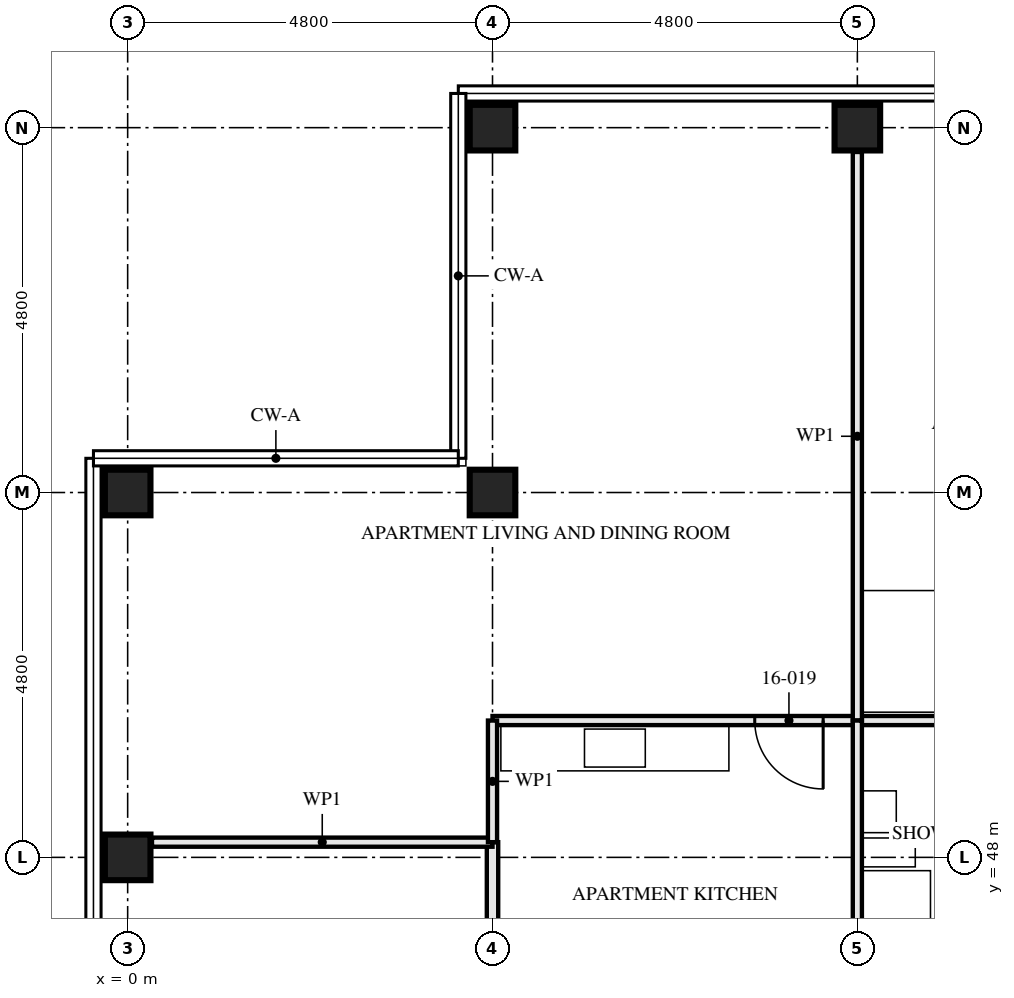
"""IFC4 building model, lengths in metres.
Left out: names, types, materials, properties, quantities, classifications, styles, units other than length and angle.
Written with IfcOpenShell. Run it as: python <this file> out.ifc"""

import sys

from ifc_helpers import new_model, si_unit, direction, frame, frame_2d, origin, origin_2d, place, context, subcontext, project, spatial, rectangle, hollow_rectangle, extrude, element, fill, save


model = new_model("IFC4")
c1 = context("Model", 3, precision=1e-05, world=origin(), true_north=direction((0.0, 1.0)))
c2 = subcontext(c1, "Body", "Model", "MODEL_VIEW")
j1 = project(units=[si_unit("LENGTHUNIT", "METRE"), si_unit("PLANEANGLEUNIT", "RADIAN")], contexts=[c1])
p1 = place(None, origin())
s1 = spatial("IfcSite", under=j1, at=p1, CompositionType="ELEMENT")
p2 = place(p1, origin())
s2 = spatial("IfcBuilding", under=s1, at=p2, CompositionType="ELEMENT")
p3 = place(p2, frame((0.0, 0.0, 62.0)))
s3 = spatial("IfcBuildingStorey", under=s2, at=p3, CompositionType="ELEMENT", Elevation=62.0)
for number, where, z_axis, x_axis in (
    (1, (0.0, 48.0, 0.0), (0.0, 0.0, 1.0), (1.0, 0.0, 0.0)),
    (2, (0.0, 52.8, 0.0), (0.0, 0.0, 1.0), (0.0, 1.0, 0.0)),
    (3, (4.8, 52.8, 0.0), (0.0, 0.0, 1.0), (0.0, 1.0, 0.0)),
    (4, (4.8, 57.6, 0.0), (0.0, 0.0, 1.0), (0.0, 1.0, 0.0)),
    (5, (9.6, 57.6, 0.0), (0.0, 0.0, 1.0), (0.0, 1.0, 0.0)),
):
    element("IfcColumn", number, at=place(p3, frame(where, z_axis=z_axis, x_axis=x_axis)), inside=s3, PredefinedType="COLUMN", context=c2, shape_type="SweptSolid", body=[
        extrude(hollow_rectangle(XDim=0.6, YDim=0.6, WallThickness=0.08, at=origin_2d()), origin(), (0.0, 0.0, 1.0), 3.5),
    ])
p4 = place(p3, frame((4.8, 48.2, 0.0), z_axis=(0.0, 0.0, 1.0), x_axis=(0.0, -1.0, 0.0)))
e6 = element("IfcWall", 6, at=p4, inside=s3, PredefinedType="PARTITIONING", context=c2, shape_type="SweptSolid", body=[
    extrude(rectangle(XDim=3.0, YDim=0.15, at=frame_2d((1.5, 0.0))), origin(), (0.0, 0.0, 1.0), 2.55),
])
p5 = place(p4, frame((1.05, 0.0, 0.0)))
e7 = element("IfcOpeningElement", 7, at=p5, cuts=e6, PredefinedType="OPENING", context=c2, shape_type="SweptSolid", body=[
    extrude(rectangle(XDim=0.9, YDim=2.1, at=frame_2d((0.45, 1.05))), frame((0.0, 0.085, 0.0), z_axis=(0.0, -1.0, 0.0), x_axis=(1.0, 0.0, 0.0)), (0.0, 0.0, 1.0), 0.171),
])
p6 = place(p3, frame((9.6, 49.8, 0.0), z_axis=(0.0, 0.0, 1.0), x_axis=(0.0, -1.0, 0.0)))
e8 = element("IfcWall", 8, at=p6, inside=s3, PredefinedType="PARTITIONING", context=c2, shape_type="SweptSolid", body=[
    extrude(rectangle(XDim=4.65, YDim=0.12, at=frame_2d((2.325, 0.0))), origin(), (0.0, 0.0, 1.0), 2.55),
])
p7 = place(p6, frame((3.35, 0.0, 0.0)))
e9 = element("IfcOpeningElement", 9, at=p7, cuts=e8, PredefinedType="OPENING", context=c2, shape_type="SweptSolid", body=[
    extrude(rectangle(XDim=0.9, YDim=2.1, at=frame_2d((0.45, 1.05))), frame((0.0, 0.071, 0.0), z_axis=(0.0, -1.0, 0.0), x_axis=(1.0, 0.0, 0.0)), (0.0, 0.0, 1.0), 0.141),
])
p8 = place(p3, frame((14.4, 49.8, 0.0), z_axis=(0.0, 0.0, 1.0), x_axis=(-1.0, 0.0, 0.0)))
e10 = element("IfcWall", 10, at=p8, inside=s3, PredefinedType="PARTITIONING", context=c2, shape_type="SweptSolid", body=[
    extrude(rectangle(XDim=4.8, YDim=0.12, at=frame_2d((2.4, 0.0))), origin(), (0.0, 0.0, 1.0), 3.33),
])
p9 = place(p8, frame((0.45, 0.0, 0.0)))
e11 = element("IfcOpeningElement", 11, at=p9, cuts=e10, PredefinedType="OPENING", context=c2, shape_type="SweptSolid", body=[
    extrude(rectangle(XDim=0.9, YDim=2.1, at=frame_2d((0.45, 1.05))), frame((0.0, 0.071, 0.0), z_axis=(0.0, -1.0, 0.0), x_axis=(1.0, 0.0, 0.0)), (0.0, 0.0, 1.0), 0.141),
])
p10 = place(p3, frame((9.6, 49.8, 0.0), z_axis=(0.0, 0.0, 1.0), x_axis=(-1.0, 0.0, 0.0)))
e12 = element("IfcWall", 12, at=p10, inside=s3, PredefinedType="PARTITIONING", context=c2, shape_type="SweptSolid", body=[
    extrude(rectangle(XDim=4.8, YDim=0.12, at=frame_2d((2.4, 0.0))), origin(), (0.0, 0.0, 1.0), 3.33),
])
p11 = place(p10, frame((0.45, 0.0, 0.0)))
e13 = element("IfcOpeningElement", 13, at=p11, cuts=e12, PredefinedType="OPENING", context=c2, shape_type="SweptSolid", body=[
    extrude(rectangle(XDim=0.9, YDim=2.1, at=frame_2d((0.45, 1.05))), frame((0.0, 0.071, 0.0), z_axis=(0.0, -1.0, 0.0), x_axis=(1.0, 0.0, 0.0)), (0.0, 0.0, 1.0), 0.141),
])
p12 = place(p3, frame((4.8, 48.2, 0.0), z_axis=(0.0, 0.0, 1.0), x_axis=(-1.0, 0.0, 0.0)))
e14 = element("IfcWall", 14, at=p12, inside=s3, PredefinedType="PARTITIONING", context=c2, shape_type="SweptSolid", body=[
    extrude(rectangle(XDim=4.48, YDim=0.12, at=frame_2d((2.24, 0.0))), origin(), (0.0, 0.0, 1.0), 3.33),
])
p13 = place(p3, frame((9.6, 57.28, 0.0), z_axis=(0.0, 0.0, 1.0), x_axis=(0.0, -1.0, 0.0)))
e15 = element("IfcWall", 15, at=p13, inside=s3, PredefinedType="PARTITIONING", context=c2, shape_type="SweptSolid", body=[
    extrude(rectangle(XDim=7.48, YDim=0.12, at=frame_2d((3.74, 0.0))), origin(), (0.0, 0.0, 1.0), 2.55),
])
p14 = place(p3, frame((4.8, 49.8, 0.0), z_axis=(0.0, 0.0, 1.0), x_axis=(0.0, -1.0, 0.0)))
e16 = element("IfcWall", 16, at=p14, inside=s3, PredefinedType="PARTITIONING", context=c2, shape_type="SweptSolid", body=[
    extrude(rectangle(XDim=1.6, YDim=0.12, at=frame_2d((0.8, 0.0))), origin(), (0.0, 0.0, 1.0), 3.33),
])
p15 = place(p11, origin())
e17 = element("IfcDoor", 17, at=p15, inside=s3, OperationType="SINGLE_SWING_RIGHT", PredefinedType="DOOR", context=c2, shape_type="SweptSolid", body=[
    extrude(rectangle(XDim=0.9, YDim=2.1, at=frame_2d((0.45, 1.05))), frame((0.0, 0.022, 0.0), z_axis=(0.0, -1.0, 0.0), x_axis=(1.0, 0.0, 0.0)), (0.0, 0.0, 1.0), 0.044),
])
fill(e13, e17)
save(model, sys.argv[1])
